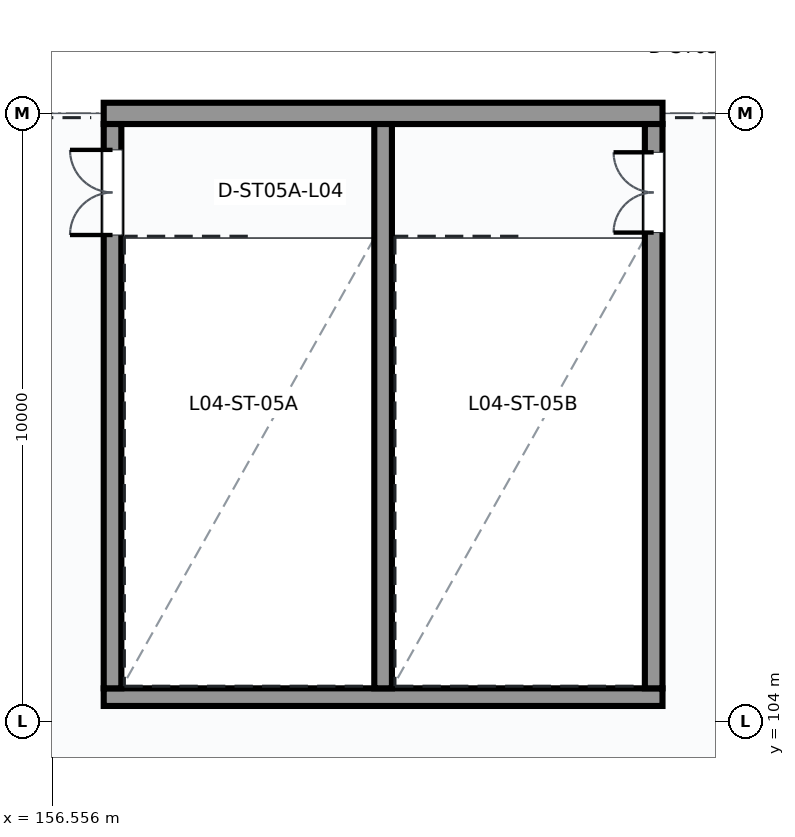
"""IFC4 building model, lengths in metres.
Left out: names, types, materials, properties, quantities, classifications, styles, units other than length and angle.
Written with IfcOpenShell. Run it as: python <this file> out.ifc"""

import sys

from ifc_helpers import new_model, si_unit, direction, frame, frame_2d, origin, place, context, subcontext, project, spatial, rectangle, extrude, element, fill, save


model = new_model("IFC4")
c1 = context("Model", 3, precision=1e-05, world=origin(), true_north=direction((0.0, 1.0)))
c2 = subcontext(c1, "Body", "Model", "MODEL_VIEW")
j1 = project(units=[si_unit("LENGTHUNIT", "METRE"), si_unit("PLANEANGLEUNIT", "RADIAN")], contexts=[c1])
p1 = place(None, origin())
s1 = spatial("IfcSite", under=j1, at=p1, CompositionType="ELEMENT")
p2 = place(p1, origin())
s2 = spatial("IfcBuilding", under=s1, at=p2, CompositionType="ELEMENT")
p3 = place(p2, frame((0.0, 0.0, 19.2)))
s3 = spatial("IfcBuildingStorey", under=s2, at=p3, CompositionType="ELEMENT", Elevation=19.2)
p4 = place(p3, frame((157.405, 104.4, 0.0), z_axis=(0.0, 0.0, 1.0), x_axis=(1.0, 0.0, 0.0)))
e1 = element("IfcWall", 1, at=p4, inside=s3, PredefinedType="SHEAR", context=c2, shape_type="SweptSolid", body=[
    extrude(rectangle(XDim=9.19, YDim=0.29, at=frame_2d((4.595, 0.0))), origin(), (0.0, 0.0, 1.0), 5.4),
])
p5 = place(p3, frame((157.405, 114.0, 0.0), z_axis=(0.0, 0.0, 1.0), x_axis=(1.0, 0.0, 0.0)))
e2 = element("IfcWall", 2, at=p5, inside=s3, PredefinedType="SHEAR", context=c2, shape_type="SweptSolid", body=[
    extrude(rectangle(XDim=9.19, YDim=0.35, at=frame_2d((4.595, 0.0))), origin(), (0.0, 0.0, 1.0), 5.4),
])
p6 = place(p3, frame((157.55, 104.545, 0.0), z_axis=(0.0, 0.0, 1.0), x_axis=(0.0, 1.0, 0.0)))
e3 = element("IfcWall", 3, at=p6, inside=s3, PredefinedType="SHEAR", context=c2, shape_type="SweptSolid", body=[
    extrude(rectangle(XDim=9.28, YDim=0.29, at=frame_2d((4.64, 0.0))), origin(), (0.0, 0.0, 1.0), 5.4),
])
p7 = place(p6, frame((7.455, 0.0, 0.0)))
e4 = element("IfcOpeningElement", 4, at=p7, cuts=e3, PredefinedType="OPENING", context=c2, shape_type="SweptSolid", body=[
    extrude(rectangle(XDim=1.4, YDim=2.2, at=frame_2d((0.7, 1.1))), frame((0.0, 0.155, 0.0), z_axis=(0.0, -1.0, 0.0), x_axis=(1.0, 0.0, 0.0)), (0.0, 0.0, 1.0), 0.31),
])
p8 = place(p3, frame((166.45, 104.545, 0.0), z_axis=(0.0, 0.0, 1.0), x_axis=(0.0, 1.0, 0.0)))
e5 = element("IfcWall", 5, at=p8, inside=s3, PredefinedType="SHEAR", context=c2, shape_type="SweptSolid", body=[
    extrude(rectangle(XDim=9.28, YDim=0.29, at=frame_2d((4.64, 0.0))), origin(), (0.0, 0.0, 1.0), 5.4),
])
p9 = place(p8, frame((7.495, 0.0, 0.0)))
e6 = element("IfcOpeningElement", 6, at=p9, cuts=e5, PredefinedType="OPENING", context=c2, shape_type="SweptSolid", body=[
    extrude(rectangle(XDim=1.32, YDim=2.2, at=frame_2d((0.66, 1.1))), frame((0.0, 0.155, 0.0), z_axis=(0.0, -1.0, 0.0), x_axis=(1.0, 0.0, 0.0)), (0.0, 0.0, 1.0), 0.31),
])
p10 = place(p3, frame((162.0, 104.545, 0.0), z_axis=(0.0, 0.0, 1.0), x_axis=(0.0, 1.0, 0.0)))
e7 = element("IfcWall", 7, at=p10, inside=s3, PredefinedType="SHEAR", context=c2, shape_type="SweptSolid", body=[
    extrude(rectangle(XDim=9.28, YDim=0.29, at=frame_2d((4.64, 0.0))), origin(), (0.0, 0.0, 1.0), 5.4),
])
p11 = place(p7, frame((1.4, 0.0, 0.0), z_axis=(0.0, 0.0, 1.0), x_axis=(-1.0, 0.0, 0.0)))
e8 = element("IfcDoor", 8, at=p11, inside=s3, OperationType="DOUBLE_DOOR_SINGLE_SWING", PredefinedType="DOOR", context=c2, shape_type="SweptSolid", body=[
    extrude(rectangle(XDim=1.4, YDim=2.2, at=frame_2d((0.7, 1.1))), frame((0.0, 0.025, 0.0), z_axis=(0.0, -1.0, 0.0), x_axis=(1.0, 0.0, 0.0)), (0.0, 0.0, 1.0), 0.05),
])
fill(e4, e8)
p12 = place(p9, origin())
e9 = element("IfcDoor", 9, at=p12, inside=s3, OperationType="DOUBLE_DOOR_SINGLE_SWING", PredefinedType="DOOR", context=c2, shape_type="SweptSolid", body=[
    extrude(rectangle(XDim=1.32, YDim=2.2, at=frame_2d((0.66, 1.1))), frame((0.0, 0.025, 0.0), z_axis=(0.0, -1.0, 0.0), x_axis=(1.0, 0.0, 0.0)), (0.0, 0.0, 1.0), 0.05),
])
fill(e6, e9)
save(model, sys.argv[1])
